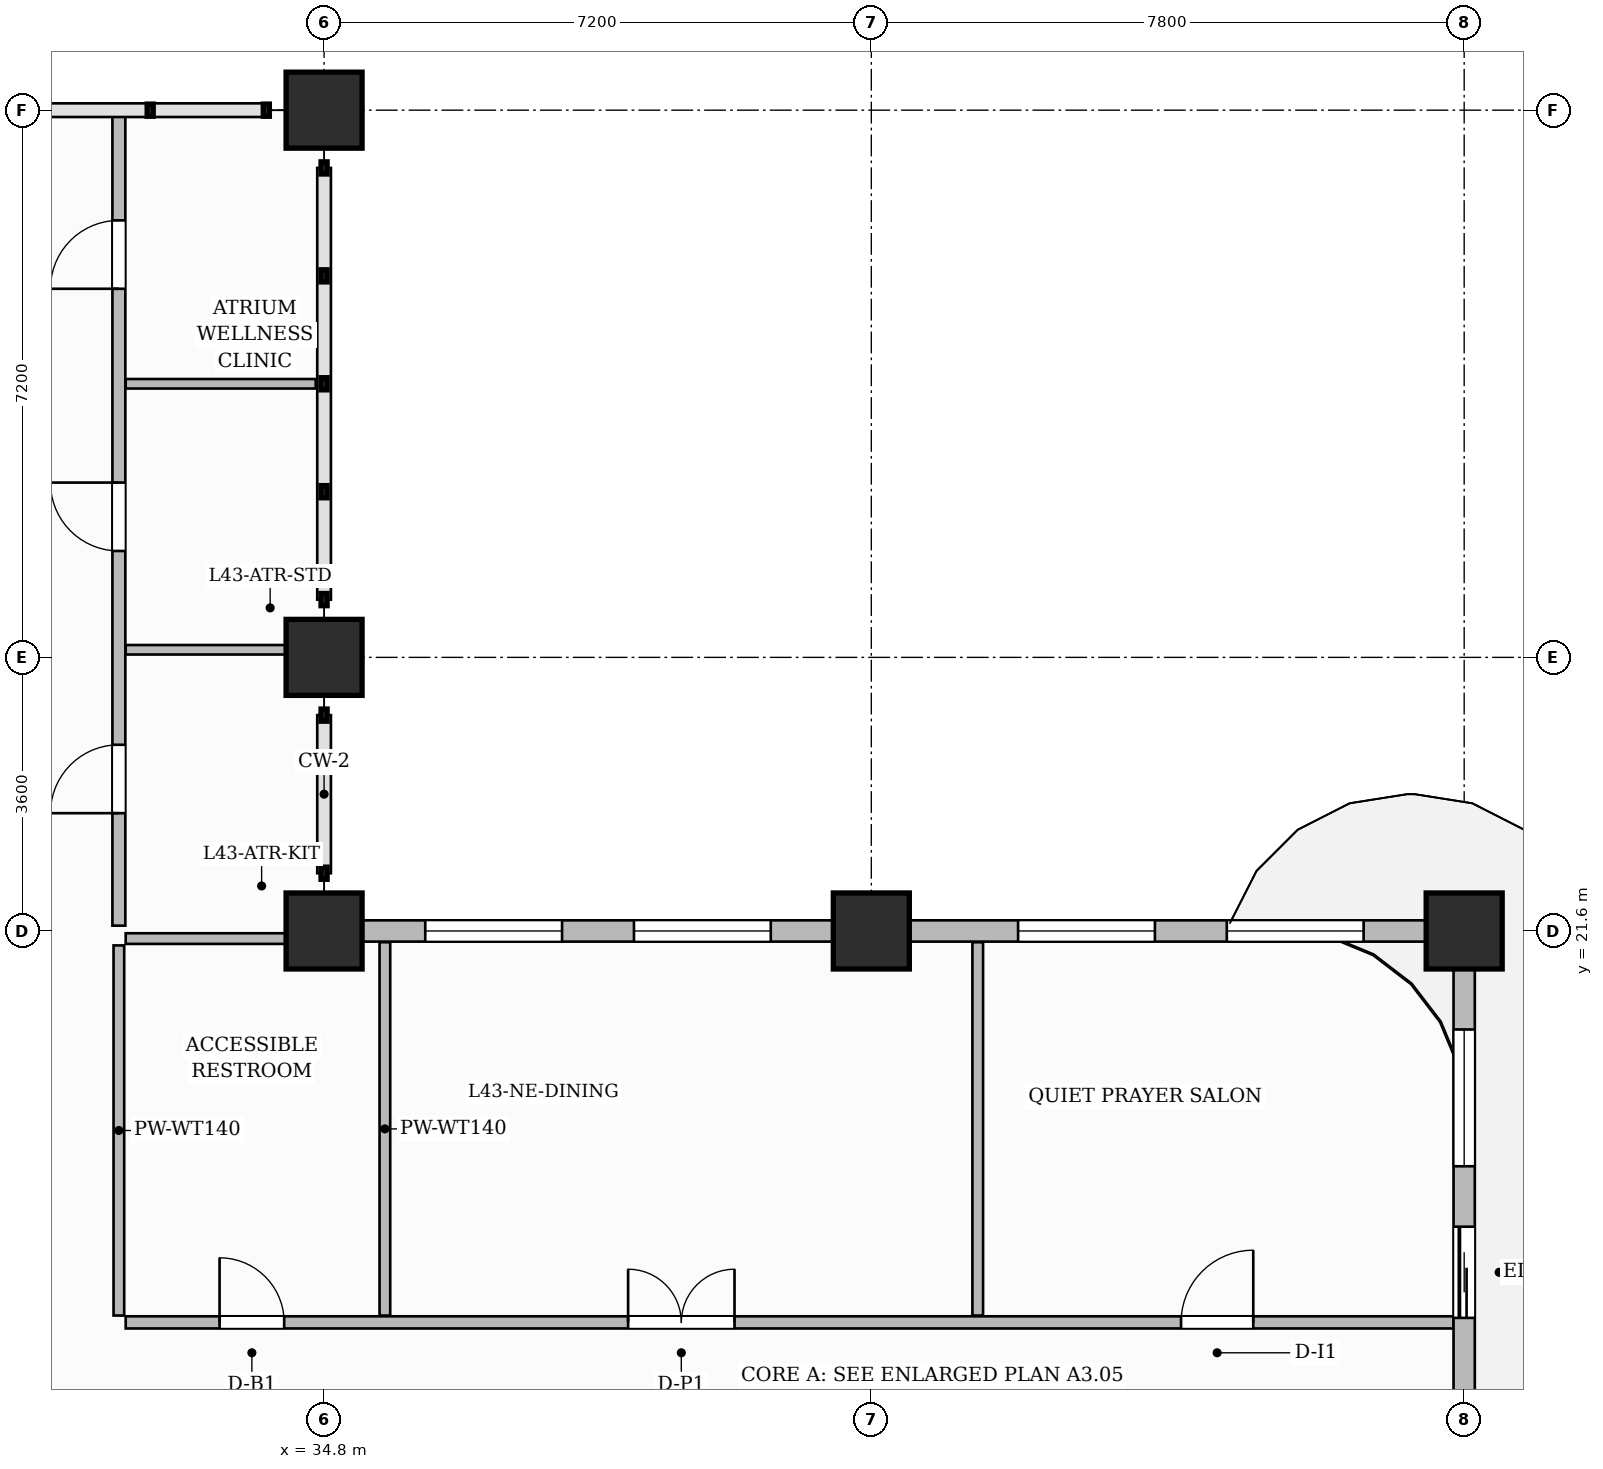
"""IFC4 building model, lengths in metres.
Left out: names, types, materials, properties, quantities, classifications, styles, units other than length and angle.
Written with IfcOpenShell. Run it as: python <this file> out.ifc"""

import sys

from ifc_helpers import new_model, si_unit, direction, frame, frame_2d, origin, origin_2d, place, context, subcontext, project, spatial, rectangle, extrude, source, transform, mapped, element, fill, save


model = new_model("IFC4")
c1 = context("Model", 3, precision=1e-05, world=origin(), true_north=direction((0.0, 1.0)))
c2 = subcontext(c1, "Body", "Model", "MODEL_VIEW")
j1 = project(units=[si_unit("LENGTHUNIT", "METRE"), si_unit("PLANEANGLEUNIT", "RADIAN")], contexts=[c1])
p1 = place(None, origin())
s1 = spatial("IfcSite", under=j1, at=p1, CompositionType="ELEMENT")
p2 = place(p1, origin())
s2 = spatial("IfcBuilding", under=s1, at=p2, CompositionType="ELEMENT")
p3 = place(p2, frame((0.0, 0.0, 173.4)))
s3 = spatial("IfcBuildingStorey", under=s2, at=p3, CompositionType="ELEMENT", Elevation=173.4)
m1 = source(origin(), c2, "Body", "SweptSolid", [
    extrude(rectangle(XDim=1.0, YDim=1.0, at=origin_2d()), origin(), (0.0, 0.0, 1.0), 3.85),
])
for number, where, z_axis, x_axis in (
    (1, (34.8, 21.6, 0.0), (0.0, 0.0, 1.0), (1.0, 0.0, 0.0)),
    (2, (34.8, 25.2, 0.0), (0.0, 0.0, 1.0), (1.0, 0.0, 0.0)),
    (3, (34.8, 32.4, 0.0), (0.0, 0.0, 1.0), (1.0, 0.0, 0.0)),
    (4, (42.0, 21.6, 0.0), (0.0, 0.0, 1.0), (1.0, 0.0, 0.0)),
    (5, (49.8, 21.6, 0.0), (0.0, 0.0, 1.0), (1.0, 0.0, 0.0)),
):
    element("IfcColumn", number, at=place(p3, frame(where, z_axis=z_axis, x_axis=x_axis)), inside=s3, PredefinedType="COLUMN", context=c2, shape_type="MappedRepresentation", body=[
        mapped(m1, transform((0.0, 0.0, 0.0), scale=1.0)),
    ])
p4 = place(p3, frame((32.19, 16.45, 0.0), z_axis=(0.0, 0.0, 1.0), x_axis=(1.0, 0.0, 0.0)))
e6 = element("IfcWall", 6, at=p4, inside=s3, PredefinedType="PARTITIONING", context=c2, shape_type="SweptSolid", body=[
    extrude(rectangle(XDim=17.47, YDim=0.16, at=frame_2d((8.735, 0.0))), origin(), (0.0, 0.0, 1.0), 3.6),
])
p5 = place(p4, frame((1.235, 0.0, 0.0)))
e7 = element("IfcOpeningElement", 7, at=p5, cuts=e6, PredefinedType="OPENING", context=c2, shape_type="SweptSolid", body=[
    extrude(rectangle(XDim=0.85, YDim=2.1, at=frame_2d((0.425, 1.05))), frame((0.0, 0.09, 0.0), z_axis=(0.0, -1.0, 0.0), x_axis=(1.0, 0.0, 0.0)), (0.0, 0.0, 1.0), 0.18),
])
p6 = place(p4, frame((6.61, 0.0, 0.0)))
e8 = element("IfcOpeningElement", 8, at=p6, cuts=e6, PredefinedType="OPENING", context=c2, shape_type="SweptSolid", body=[
    extrude(rectangle(XDim=1.4, YDim=2.35, at=frame_2d((0.7, 1.175))), frame((0.0, 0.09, 0.0), z_axis=(0.0, -1.0, 0.0), x_axis=(1.0, 0.0, 0.0)), (0.0, 0.0, 1.0), 0.18),
])
p7 = place(p4, frame((13.885, 0.0, 0.0)))
e9 = element("IfcOpeningElement", 9, at=p7, cuts=e6, PredefinedType="OPENING", context=c2, shape_type="SweptSolid", body=[
    extrude(rectangle(XDim=0.95, YDim=2.15, at=frame_2d((0.475, 1.075))), frame((0.0, 0.09, 0.0), z_axis=(0.0, -1.0, 0.0), x_axis=(1.0, 0.0, 0.0)), (0.0, 0.0, 1.0), 0.18),
])
p8 = place(p3, frame((32.1, 16.54, 0.0), z_axis=(0.0, 0.0, 1.0), x_axis=(0.0, 1.0, 0.0)))
e10 = element("IfcWall", 10, at=p8, inside=s3, PredefinedType="PARTITIONING", context=c2, shape_type="SweptSolid", body=[
    extrude(rectangle(XDim=4.87, YDim=0.14, at=frame_2d((2.435, 0.0))), origin(), (0.0, 0.0, 1.0), 3.6),
])
for number, where, z_axis, x_axis in (
    (11, (35.6, 16.54, 0.0), (0.0, 0.0, 1.0), (0.0, 1.0, 0.0)),
    (12, (43.4, 16.54, 0.0), (0.0, 0.0, 1.0), (0.0, 1.0, 0.0)),
):
    element("IfcWall", number, at=place(p3, frame(where, z_axis=z_axis, x_axis=x_axis)), inside=s3, PredefinedType="PARTITIONING", context=c2, shape_type="SweptSolid", body=[
        extrude(rectangle(XDim=4.912, YDim=0.14, at=frame_2d((2.456, 0.0))), origin(), (0.0, 0.0, 1.0), 3.6),
    ])
p9 = place(p3, frame((32.19, 21.5, 0.0), z_axis=(0.0, 0.0, 1.0), x_axis=(1.0, 0.0, 0.0)))
e13 = element("IfcWall", 13, at=p9, inside=s3, PredefinedType="PARTITIONING", context=c2, shape_type="SweptSolid", body=[
    extrude(rectangle(XDim=2.42, YDim=0.14, at=frame_2d((1.21, 0.0))), origin(), (0.0, 0.0, 1.0), 3.085),
])
p10 = place(p3, frame((32.1, 21.67, 0.0), z_axis=(0.0, 0.0, 1.0), x_axis=(0.0, 1.0, 0.0)))
e14 = element("IfcWall", 14, at=p10, inside=s3, PredefinedType="PARTITIONING", context=c2, shape_type="SweptSolid", body=[
    extrude(rectangle(XDim=10.702, YDim=0.17, at=frame_2d((5.351, 0.0))), origin(), (0.0, 0.0, 1.0), 3.6),
])
p11 = place(p10, frame((1.48, 0.0, 0.0)))
e15 = element("IfcOpeningElement", 15, at=p11, cuts=e14, PredefinedType="OPENING", context=c2, shape_type="SweptSolid", body=[
    extrude(rectangle(XDim=0.9, YDim=2.15, at=frame_2d((0.45, 1.075))), frame((0.0, 0.095, 0.0), z_axis=(0.0, -1.0, 0.0), x_axis=(1.0, 0.0, 0.0)), (0.0, 0.0, 1.0), 0.19),
])
p12 = place(p10, frame((4.93, 0.0, 0.0)))
e16 = element("IfcOpeningElement", 16, at=p12, cuts=e14, PredefinedType="OPENING", context=c2, shape_type="SweptSolid", body=[
    extrude(rectangle(XDim=0.9, YDim=2.15, at=frame_2d((0.45, 1.075))), frame((0.0, 0.095, 0.0), z_axis=(0.0, -1.0, 0.0), x_axis=(1.0, 0.0, 0.0)), (0.0, 0.0, 1.0), 0.19),
])
p13 = place(p10, frame((8.38, 0.0, 0.0)))
e17 = element("IfcOpeningElement", 17, at=p13, cuts=e14, PredefinedType="OPENING", context=c2, shape_type="SweptSolid", body=[
    extrude(rectangle(XDim=0.9, YDim=2.15, at=frame_2d((0.45, 1.075))), frame((0.0, 0.095, 0.0), z_axis=(0.0, -1.0, 0.0), x_axis=(1.0, 0.0, 0.0)), (0.0, 0.0, 1.0), 0.19),
])
for number, where, z_axis, x_axis in (
    (18, (32.19, 25.3, 0.0), (0.0, 0.0, 1.0), (1.0, 0.0, 0.0)),
    (19, (32.19, 28.8, 0.0), (0.0, 0.0, 1.0), (1.0, 0.0, 0.0)),
):
    element("IfcWall", number, at=place(p3, frame(where, z_axis=z_axis, x_axis=x_axis)), inside=s3, PredefinedType="PARTITIONING", context=c2, shape_type="SweptSolid", body=[
        extrude(rectangle(XDim=2.5, YDim=0.125, at=frame_2d((1.25, 0.0))), origin(), (0.0, 0.0, 1.0), 3.6),
    ])
p14 = place(p3, frame((49.8, 14.62, 0.0), z_axis=(0.0, 0.0, 1.0), x_axis=(0.0, 1.0, 0.0)))
e20 = element("IfcWall", 20, at=p14, inside=s3, PredefinedType="SOLIDWALL", context=c2, shape_type="SweptSolid", body=[
    extrude(rectangle(XDim=6.93, YDim=0.28, at=frame_2d((3.465, 0.0))), origin(), (0.0, 0.0, 1.0), 3.085),
])
p15 = place(p14, frame((1.889, 0.0, 0.0)))
e21 = element("IfcOpeningElement", 21, at=p15, cuts=e20, PredefinedType="OPENING", context=c2, shape_type="SweptSolid", body=[
    extrude(rectangle(XDim=1.2, YDim=2.2, at=frame_2d((0.6, 1.1))), frame((0.0, 0.15, 0.0), z_axis=(0.0, -1.0, 0.0), x_axis=(1.0, 0.0, 0.0)), (0.0, 0.0, 1.0), 0.3),
])
p16 = place(p14, frame((3.884, 0.0, 0.8)))
e22 = element("IfcOpeningElement", 22, at=p16, cuts=e20, PredefinedType="OPENING", context=c2, shape_type="SweptSolid", body=[
    extrude(rectangle(XDim=1.8, YDim=1.85, at=frame_2d((0.9, 0.925))), frame((0.0, 0.15, 0.0), z_axis=(0.0, -1.0, 0.0), x_axis=(1.0, 0.0, 0.0)), (0.0, 0.0, 1.0), 0.3),
])
p17 = place(p3, frame((34.8, 21.6, 0.0), z_axis=(0.0, 0.0, 1.0), x_axis=(1.0, 0.0, 0.0)))
e23 = element("IfcWall", 23, at=p17, inside=s3, PredefinedType="SOLIDWALL", context=c2, shape_type="SweptSolid", body=[
    extrude(rectangle(XDim=15.0, YDim=0.28, at=frame_2d((7.5, 0.0))), origin(), (0.0, 0.0, 1.0), 3.085),
])
p18 = place(p17, frame((1.331, 0.0, 0.8)))
e24 = element("IfcOpeningElement", 24, at=p18, cuts=e23, PredefinedType="OPENING", context=c2, shape_type="SweptSolid", body=[
    extrude(rectangle(XDim=1.8, YDim=1.85, at=frame_2d((0.9, 0.925))), frame((0.0, 0.15, 0.0), z_axis=(0.0, -1.0, 0.0), x_axis=(1.0, 0.0, 0.0)), (0.0, 0.0, 1.0), 0.3),
])
p19 = place(p17, frame((4.077, 0.0, 0.8)))
e25 = element("IfcOpeningElement", 25, at=p19, cuts=e23, PredefinedType="OPENING", context=c2, shape_type="SweptSolid", body=[
    extrude(rectangle(XDim=1.8, YDim=1.85, at=frame_2d((0.9, 0.925))), frame((0.0, 0.15, 0.0), z_axis=(0.0, -1.0, 0.0), x_axis=(1.0, 0.0, 0.0)), (0.0, 0.0, 1.0), 0.3),
])
p20 = place(p17, frame((9.131, 0.0, 0.8)))
e26 = element("IfcOpeningElement", 26, at=p20, cuts=e23, PredefinedType="OPENING", context=c2, shape_type="SweptSolid", body=[
    extrude(rectangle(XDim=1.8, YDim=1.85, at=frame_2d((0.9, 0.925))), frame((0.0, 0.15, 0.0), z_axis=(0.0, -1.0, 0.0), x_axis=(1.0, 0.0, 0.0)), (0.0, 0.0, 1.0), 0.3),
])
p21 = place(p17, frame((11.877, 0.0, 0.8)))
e27 = element("IfcOpeningElement", 27, at=p21, cuts=e23, PredefinedType="OPENING", context=c2, shape_type="SweptSolid", body=[
    extrude(rectangle(XDim=1.8, YDim=1.85, at=frame_2d((0.9, 0.925))), frame((0.0, 0.15, 0.0), z_axis=(0.0, -1.0, 0.0), x_axis=(1.0, 0.0, 0.0)), (0.0, 0.0, 1.0), 0.3),
])
m2 = source(origin(), c2, "Body", "SweptSolid", [
    extrude(rectangle(XDim=0.85, YDim=2.1, at=frame_2d((0.425, 1.05))), frame((0.0, 0.025, 0.0), z_axis=(0.0, -1.0, 0.0), x_axis=(1.0, 0.0, 0.0)), (0.0, 0.0, 1.0), 0.05),
])
p22 = place(p5, origin())
e28 = element("IfcDoor", 28, at=p22, inside=s3, OperationType="SINGLE_SWING_LEFT", PredefinedType="DOOR", context=c2, shape_type="MappedRepresentation", body=[
    mapped(m2, transform((0.0, 0.0, 0.0), scale=1.0)),
])
fill(e7, e28)
m3 = source(origin(), c2, "Body", "SweptSolid", [
    extrude(rectangle(XDim=1.4, YDim=2.35, at=frame_2d((0.7, 1.175))), frame((0.0, 0.025, 0.0), z_axis=(0.0, -1.0, 0.0), x_axis=(1.0, 0.0, 0.0)), (0.0, 0.0, 1.0), 0.05),
])
p23 = place(p6, origin())
e29 = element("IfcDoor", 29, at=p23, inside=s3, OperationType="DOUBLE_DOOR_SINGLE_SWING", PredefinedType="DOOR", context=c2, shape_type="MappedRepresentation", body=[
    mapped(m3, transform((0.0, 0.0, 0.0), scale=1.0)),
])
fill(e8, e29)
m4 = source(origin(), c2, "Body", "SweptSolid", [
    extrude(rectangle(XDim=0.95, YDim=2.15, at=frame_2d((0.475, 1.075))), frame((0.0, 0.025, 0.0), z_axis=(0.0, -1.0, 0.0), x_axis=(1.0, 0.0, 0.0)), (0.0, 0.0, 1.0), 0.05),
])
p24 = place(p7, origin())
e30 = element("IfcDoor", 30, at=p24, inside=s3, OperationType="SINGLE_SWING_RIGHT", PredefinedType="DOOR", context=c2, shape_type="MappedRepresentation", body=[
    mapped(m4, transform((0.0, 0.0, 0.0), scale=1.0)),
])
fill(e9, e30)
m5 = source(origin(), c2, "Body", "SweptSolid", [
    extrude(rectangle(XDim=0.9, YDim=2.15, at=frame_2d((0.45, 1.075))), frame((0.0, 0.025, 0.0), z_axis=(0.0, -1.0, 0.0), x_axis=(1.0, 0.0, 0.0)), (0.0, 0.0, 1.0), 0.05),
])
p25 = place(p11, origin())
e31 = element("IfcDoor", 31, at=p25, inside=s3, OperationType="SINGLE_SWING_LEFT", PredefinedType="DOOR", context=c2, shape_type="MappedRepresentation", body=[
    mapped(m5, transform((0.0, 0.0, 0.0), scale=1.0)),
])
fill(e15, e31)
p26 = place(p12, origin())
e32 = element("IfcDoor", 32, at=p26, inside=s3, OperationType="SINGLE_SWING_RIGHT", PredefinedType="DOOR", context=c2, shape_type="MappedRepresentation", body=[
    mapped(m5, transform((0.0, 0.0, 0.0), scale=1.0)),
])
fill(e16, e32)
p27 = place(p13, origin())
e33 = element("IfcDoor", 33, at=p27, inside=s3, OperationType="SINGLE_SWING_LEFT", PredefinedType="DOOR", context=c2, shape_type="MappedRepresentation", body=[
    mapped(m5, transform((0.0, 0.0, 0.0), scale=1.0)),
])
fill(e17, e33)
m6 = source(origin(), c2, "Body", "SweptSolid", [
    extrude(rectangle(XDim=1.2, YDim=2.2, at=frame_2d((0.6, 1.1))), frame((0.0, 0.025, 0.0), z_axis=(0.0, -1.0, 0.0), x_axis=(1.0, 0.0, 0.0)), (0.0, 0.0, 1.0), 0.05),
])
p28 = place(p15, origin())
e34 = element("IfcDoor", 34, at=p28, inside=s3, OperationType="SLIDING_TO_LEFT", PredefinedType="DOOR", context=c2, shape_type="MappedRepresentation", body=[
    mapped(m6, transform((0.0, 0.0, 0.0), scale=1.0)),
])
fill(e21, e34)
m7 = source(origin(), c2, "Body", "SweptSolid", [
    extrude(rectangle(XDim=1.8, YDim=1.85, at=frame_2d((0.9, 0.925))), frame((0.0, 0.03, 0.0), z_axis=(0.0, -1.0, 0.0), x_axis=(1.0, 0.0, 0.0)), (0.0, 0.0, 1.0), 0.06),
])
p29 = place(p16, origin())
e35 = element("IfcWindow", 35, at=p29, inside=s3, PartitioningType="DOUBLE_PANEL_VERTICAL", PredefinedType="WINDOW", context=c2, shape_type="MappedRepresentation", body=[
    mapped(m7, transform((0.0, 0.0, 0.0), scale=1.0)),
])
fill(e22, e35)
p30 = place(p18, origin())
e36 = element("IfcWindow", 36, at=p30, inside=s3, PartitioningType="DOUBLE_PANEL_VERTICAL", PredefinedType="WINDOW", context=c2, shape_type="MappedRepresentation", body=[
    mapped(m7, transform((0.0, 0.0, 0.0), scale=1.0)),
])
fill(e24, e36)
p31 = place(p19, origin())
e37 = element("IfcWindow", 37, at=p31, inside=s3, PartitioningType="DOUBLE_PANEL_VERTICAL", PredefinedType="WINDOW", context=c2, shape_type="MappedRepresentation", body=[
    mapped(m7, transform((0.0, 0.0, 0.0), scale=1.0)),
])
fill(e25, e37)
p32 = place(p20, origin())
e38 = element("IfcWindow", 38, at=p32, inside=s3, PartitioningType="DOUBLE_PANEL_VERTICAL", PredefinedType="WINDOW", context=c2, shape_type="MappedRepresentation", body=[
    mapped(m7, transform((0.0, 0.0, 0.0), scale=1.0)),
])
fill(e26, e38)
p33 = place(p21, origin())
e39 = element("IfcWindow", 39, at=p33, inside=s3, PartitioningType="DOUBLE_PANEL_VERTICAL", PredefinedType="WINDOW", context=c2, shape_type="MappedRepresentation", body=[
    mapped(m7, transform((0.0, 0.0, 0.0), scale=1.0)),
])
fill(e27, e39)
save(model, sys.argv[1])
